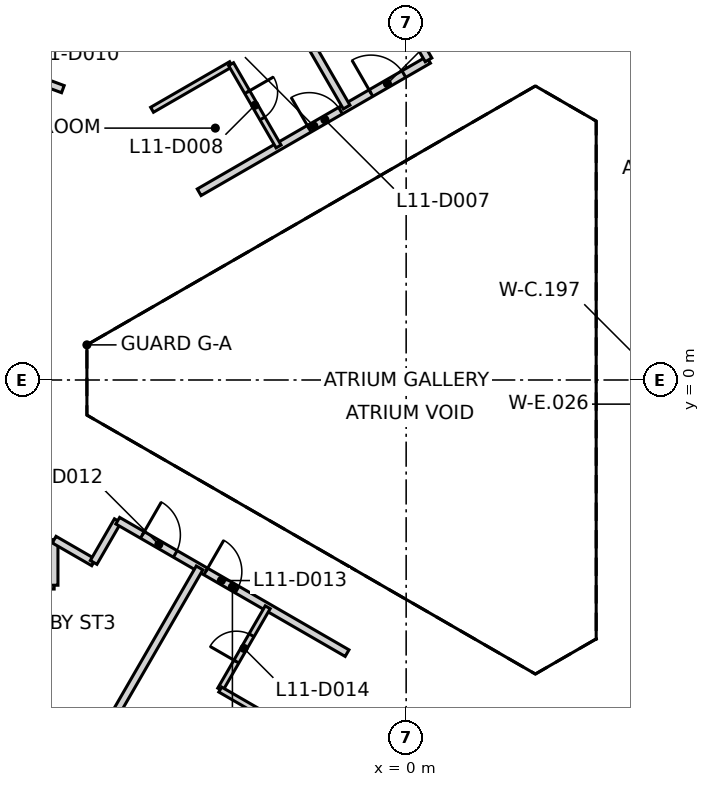
"""IFC4 building model, lengths in metres.
Left out: names, types, materials, properties, quantities, classifications, styles, units other than length and angle.
Written with IfcOpenShell. Run it as: python <this file> out.ifc"""

import sys

from ifc_helpers import new_model, si_unit, direction, frame, frame_2d, origin, place, context, subcontext, project, spatial, rectangle, extrude, element, fill, save


model = new_model("IFC4")
c1 = context("Model", 3, precision=1e-05, world=origin(), true_north=direction((0.0, 1.0)))
c2 = subcontext(c1, "Body", "Model", "MODEL_VIEW")
j1 = project(units=[si_unit("LENGTHUNIT", "METRE"), si_unit("PLANEANGLEUNIT", "RADIAN")], contexts=[c1])
p1 = place(None, origin())
s1 = spatial("IfcSite", under=j1, at=p1, CompositionType="ELEMENT")
p2 = place(p1, origin())
s2 = spatial("IfcBuilding", under=s1, at=p2, CompositionType="ELEMENT")
p3 = place(p2, frame((0.0, 0.0, 53.0)))
s3 = spatial("IfcBuildingStorey", under=s2, at=p3, CompositionType="ELEMENT", Elevation=53.0)
p4 = place(p3, frame((10.42, 6.498, 0.0), z_axis=(0.0, 0.0, 1.0), x_axis=(-0.866021906294, 0.500006057782, 0.0)))
e1 = element("IfcWall", 1, at=p4, inside=s3, PredefinedType="SHEAR", context=c2, shape_type="SweptSolid", body=[
    extrude(rectangle(XDim=11.55, YDim=0.25, at=frame_2d((5.775, 0.0))), origin(), (0.0, 0.0, 1.0), 3.125),
])
p5 = place(p4, frame((10.025, 0.0, 0.0)))
e2 = element("IfcOpeningElement", 2, at=p5, cuts=e1, PredefinedType="OPENING", context=c2, shape_type="SweptSolid", body=[
    extrude(rectangle(XDim=1.2, YDim=2.1, at=frame_2d((0.6, 1.05))), frame((0.0, 0.135, 0.0), z_axis=(0.0, -1.0, 0.0), x_axis=(1.0, 0.0, 0.0)), (0.0, 0.0, 1.0), 0.27),
])
p6 = place(p4, frame((8.725, 0.0, 0.0)))
e3 = element("IfcOpeningElement", 3, at=p6, cuts=e1, PredefinedType="OPENING", context=c2, shape_type="SweptSolid", body=[
    extrude(rectangle(XDim=1.2, YDim=2.1, at=frame_2d((0.6, 1.05))), frame((0.0, 0.135, 0.0), z_axis=(0.0, -1.0, 0.0), x_axis=(1.0, 0.0, 0.0)), (0.0, 0.0, 1.0), 0.27),
])
p7 = place(p3, frame((0.417, -12.273, 0.0), z_axis=(0.0, 0.0, 1.0), x_axis=(0.866021906294, 0.500006057782, 0.0)))
e4 = element("IfcWall", 4, at=p7, inside=s3, PredefinedType="SHEAR", context=c2, shape_type="SweptSolid", body=[
    extrude(rectangle(XDim=11.55, YDim=0.25, at=frame_2d((5.775, 0.0))), origin(), (0.0, 0.0, 1.0), 3.125),
])
p8 = place(p7, frame((10.025, 0.0, 0.0)))
e5 = element("IfcOpeningElement", 5, at=p8, cuts=e4, PredefinedType="OPENING", context=c2, shape_type="SweptSolid", body=[
    extrude(rectangle(XDim=1.2, YDim=2.1, at=frame_2d((0.6, 1.05))), frame((0.0, 0.135, 0.0), z_axis=(0.0, -1.0, 0.0), x_axis=(1.0, 0.0, 0.0)), (0.0, 0.0, 1.0), 0.27),
])
p9 = place(p7, frame((8.725, 0.0, 0.0)))
e6 = element("IfcOpeningElement", 6, at=p9, cuts=e4, PredefinedType="OPENING", context=c2, shape_type="SweptSolid", body=[
    extrude(rectangle(XDim=1.2, YDim=2.1, at=frame_2d((0.6, 1.05))), frame((0.0, 0.135, 0.0), z_axis=(0.0, -1.0, 0.0), x_axis=(1.0, 0.0, 0.0)), (0.0, 0.0, 1.0), 0.27),
])
p10 = place(p3, frame((-16.026, 10.246, 0.0), z_axis=(0.0, 0.0, 1.0), x_axis=(0.937598236139, -0.347720502112, 0.0)))
e7 = element("IfcWall", 7, at=p10, inside=s3, PredefinedType="PARTITIONING", context=c2, shape_type="SweptSolid", body=[
    extrude(rectangle(XDim=7.458, YDim=0.2, at=frame_2d((3.729, 0.0))), origin(), (0.0, 0.0, 1.0), 3.125),
])
p11 = place(p10, frame((3.396, 0.0, 0.0)))
e8 = element("IfcOpeningElement", 8, at=p11, cuts=e7, PredefinedType="OPENING", context=c2, shape_type="SweptSolid", body=[
    extrude(rectangle(XDim=0.95, YDim=2.1, at=frame_2d((0.475, 1.05))), frame((0.0, 0.11, 0.0), z_axis=(0.0, -1.0, 0.0), x_axis=(1.0, 0.0, 0.0)), (0.0, 0.0, 1.0), 0.22),
])
p12 = place(p3, frame((-10.652, -5.4, 0.0), z_axis=(0.0, 0.0, 1.0), x_axis=(1.0, 0.0, 0.0)))
e9 = element("IfcWall", 9, at=p12, inside=s3, PredefinedType="PARTITIONING", context=c2, shape_type="SweptSolid", body=[
    extrude(rectangle(XDim=1.39, YDim=0.2, at=frame_2d((0.695, 0.0))), origin(), (0.0, 0.0, 1.0), 3.125),
])
for number, where, z_axis, x_axis in (
    (10, (-9.262, -5.4, 0.0), (0.0, 0.0, 1.0), (0.0, 1.0, 0.0)),
    (11, (-9.262, -4.2, 0.0), (0.0, 0.0, 1.0), (0.866, -0.5, 0.0)),
):
    element("IfcWall", number, at=place(p3, frame(where, z_axis=z_axis, x_axis=x_axis)), inside=s3, PredefinedType="PARTITIONING", context=c2, shape_type="SweptSolid", body=[
        extrude(rectangle(XDim=1.2, YDim=0.2, at=frame_2d((0.6, 0.0))), origin(), (0.0, 0.0, 1.0), 3.125),
    ])
p13 = place(p3, frame((-8.223, -4.8, 0.0), z_axis=(0.0, 0.0, 1.0), x_axis=(0.499866914522, 0.866102227088, 0.0)))
e12 = element("IfcWall", 12, at=p13, inside=s3, PredefinedType="PARTITIONING", context=c2, shape_type="SweptSolid", body=[
    extrude(rectangle(XDim=1.268, YDim=0.2, at=frame_2d((0.634, 0.0))), origin(), (0.0, 0.0, 1.0), 3.125),
])
p14 = place(p3, frame((-7.589, -3.702, 0.0), z_axis=(0.0, 0.0, 1.0), x_axis=(0.865994210678, -0.500054024153, 0.0)))
e13 = element("IfcWall", 13, at=p14, inside=s3, PredefinedType="PARTITIONING", context=c2, shape_type="SweptSolid", body=[
    extrude(rectangle(XDim=6.969, YDim=0.2, at=frame_2d((3.484, 0.0))), origin(), (0.0, 0.0, 1.0), 3.125),
])
p15 = place(p14, frame((0.749, 0.0, 0.0)))
e14 = element("IfcOpeningElement", 14, at=p15, cuts=e13, PredefinedType="OPENING", context=c2, shape_type="SweptSolid", body=[
    extrude(rectangle(XDim=1.0, YDim=2.1, at=frame_2d((0.5, 1.05))), frame((0.0, 0.11, 0.0), z_axis=(0.0, -1.0, 0.0), x_axis=(1.0, 0.0, 0.0)), (0.0, 0.0, 1.0), 0.22),
])
p16 = place(p14, frame((2.674, 0.0, 0.0)))
e15 = element("IfcOpeningElement", 15, at=p16, cuts=e13, PredefinedType="OPENING", context=c2, shape_type="SweptSolid", body=[
    extrude(rectangle(XDim=0.95, YDim=2.1, at=frame_2d((0.475, 1.05))), frame((0.0, 0.11, 0.0), z_axis=(0.0, -1.0, 0.0), x_axis=(1.0, 0.0, 0.0)), (0.0, 0.0, 1.0), 0.22),
])
p17 = place(p3, frame((-5.446, 4.94, 0.0), z_axis=(0.0, 0.0, 1.0), x_axis=(0.866096332545, 0.499877127655, 0.0)))
e16 = element("IfcWall", 16, at=p17, inside=s3, PredefinedType="PARTITIONING", context=c2, shape_type="SweptSolid", body=[
    extrude(rectangle(XDim=6.969, YDim=0.2, at=frame_2d((3.484, 0.0))), origin(), (0.0, 0.0, 1.0), 3.125),
])
p18 = place(p17, frame((5.219, 0.0, 0.0)))
e17 = element("IfcOpeningElement", 17, at=p18, cuts=e16, PredefinedType="OPENING", context=c2, shape_type="SweptSolid", body=[
    extrude(rectangle(XDim=1.0, YDim=2.1, at=frame_2d((0.5, 1.05))), frame((0.0, 0.11, 0.0), z_axis=(0.0, -1.0, 0.0), x_axis=(1.0, 0.0, 0.0)), (0.0, 0.0, 1.0), 0.22),
])
p19 = place(p17, frame((3.344, 0.0, 0.0)))
e18 = element("IfcOpeningElement", 18, at=p19, cuts=e16, PredefinedType="OPENING", context=c2, shape_type="SweptSolid", body=[
    extrude(rectangle(XDim=0.95, YDim=2.1, at=frame_2d((0.475, 1.05))), frame((0.0, 0.11, 0.0), z_axis=(0.0, -1.0, 0.0), x_axis=(1.0, 0.0, 0.0)), (0.0, 0.0, 1.0), 0.22),
])
p20 = place(p3, frame((-0.045, 9.521, 0.0), z_axis=(0.0, 0.0, 1.0), x_axis=(0.500094716449, -0.865970712311, 0.0)))
e19 = element("IfcWall", 19, at=p20, inside=s3, PredefinedType="PARTITIONING", context=c2, shape_type="SweptSolid", body=[
    extrude(rectangle(XDim=1.268, YDim=0.2, at=frame_2d((0.634, 0.0))), origin(), (0.0, 0.0, 1.0), 3.125),
])
p21 = place(p3, frame((-14.148, -20.035, 0.0), z_axis=(0.0, 0.0, 1.0), x_axis=(0.499978771293, 0.866037659837, 0.0)))
e20 = element("IfcWall", 20, at=p21, inside=s3, PredefinedType="PARTITIONING", context=c2, shape_type="SweptSolid", body=[
    extrude(rectangle(XDim=17.425, YDim=0.2, at=frame_2d((8.712, 0.0))), origin(), (0.0, 0.0, 1.0), 3.125),
])
p22 = place(p3, frame((-10.276, 22.271, 0.0), z_axis=(0.0, 0.0, 1.0), x_axis=(0.499958184216, -0.866049544793, 0.0)))
e21 = element("IfcWall", 21, at=p22, inside=s3, PredefinedType="PARTITIONING", context=c2, shape_type="SweptSolid", body=[
    extrude(rectangle(XDim=17.422, YDim=0.2, at=frame_2d((8.711, 0.0))), origin(), (0.0, 0.0, 1.0), 3.125),
])
p23 = place(p3, frame((-6.686, 7.11, 0.0), z_axis=(0.0, 0.0, 1.0), x_axis=(0.866100915363, 0.499869187296, 0.0)))
e22 = element("IfcWall", 22, at=p23, inside=s3, PredefinedType="PARTITIONING", context=c2, shape_type="SweptSolid", body=[
    extrude(rectangle(XDim=2.401, YDim=0.15, at=frame_2d((1.2, 0.0))), origin(), (0.0, 0.0, 1.0), 3.125),
])
p24 = place(p3, frame((-4.892, -8.145, 0.0), z_axis=(0.0, 0.0, 1.0), x_axis=(0.499711178953, 0.866192090491, 0.0)))
e23 = element("IfcWall", 23, at=p24, inside=s3, PredefinedType="PARTITIONING", context=c2, shape_type="SweptSolid", body=[
    extrude(rectangle(XDim=2.5, YDim=0.15, at=frame_2d((1.25, 0.0))), origin(), (0.0, 0.0, 1.0), 3.125),
])
p25 = place(p24, frame((0.85, 0.0, 0.0)))
e24 = element("IfcOpeningElement", 24, at=p25, cuts=e23, PredefinedType="OPENING", context=c2, shape_type="SweptSolid", body=[
    extrude(rectangle(XDim=0.8, YDim=2.1, at=frame_2d((0.4, 1.05))), frame((0.0, 0.085, 0.0), z_axis=(0.0, -1.0, 0.0), x_axis=(1.0, 0.0, 0.0)), (0.0, 0.0, 1.0), 0.17),
])
p26 = place(p3, frame((-4.892, -8.145, 0.0), z_axis=(0.0, 0.0, 1.0), x_axis=(0.865999212041, -0.500045362686, 0.0)))
e25 = element("IfcWall", 25, at=p26, inside=s3, PredefinedType="PARTITIONING", context=c2, shape_type="SweptSolid", body=[
    extrude(rectangle(XDim=2.4, YDim=0.15, at=frame_2d((1.2, 0.0))), origin(), (0.0, 0.0, 1.0), 3.125),
])
p27 = place(p3, frame((-4.607, 8.31, 0.0), z_axis=(0.0, 0.0, 1.0), x_axis=(0.500004234368, -0.866022959057, 0.0)))
e26 = element("IfcWall", 26, at=p27, inside=s3, PredefinedType="PARTITIONING", context=c2, shape_type="SweptSolid", body=[
    extrude(rectangle(XDim=2.5, YDim=0.15, at=frame_2d((1.25, 0.0))), origin(), (0.0, 0.0, 1.0), 3.125),
])
p28 = place(p27, frame((0.85, 0.0, 0.0)))
e27 = element("IfcOpeningElement", 27, at=p28, cuts=e26, PredefinedType="OPENING", context=c2, shape_type="SweptSolid", body=[
    extrude(rectangle(XDim=0.8, YDim=2.1, at=frame_2d((0.4, 1.05))), frame((0.0, 0.085, 0.0), z_axis=(0.0, -1.0, 0.0), x_axis=(1.0, 0.0, 0.0)), (0.0, 0.0, 1.0), 0.17),
])
p29 = place(p18, origin())
e28 = element("IfcDoor", 28, at=p29, inside=s3, OperationType="SINGLE_SWING_LEFT", PredefinedType="DOOR", context=c2, shape_type="SweptSolid", body=[
    extrude(rectangle(XDim=1.0, YDim=2.1, at=frame_2d((0.5, 1.05))), frame((0.0, 0.025, 0.0), z_axis=(0.0, -1.0, 0.0), x_axis=(1.0, 0.0, 0.0)), (0.0, 0.0, 1.0), 0.05),
])
fill(e17, e28)
p30 = place(p19, origin())
e29 = element("IfcDoor", 29, at=p30, inside=s3, OperationType="SINGLE_SWING_LEFT", PredefinedType="DOOR", context=c2, shape_type="SweptSolid", body=[
    extrude(rectangle(XDim=0.95, YDim=2.1, at=frame_2d((0.475, 1.05))), frame((0.0, 0.025, 0.0), z_axis=(0.0, -1.0, 0.0), x_axis=(1.0, 0.0, 0.0)), (0.0, 0.0, 1.0), 0.05),
])
fill(e18, e29)
p31 = place(p28, frame((0.8, 0.0, 0.0), z_axis=(0.0, 0.0, 1.0), x_axis=(-1.0, 0.0, 0.0)))
e30 = element("IfcDoor", 30, at=p31, inside=s3, OperationType="SINGLE_SWING_LEFT", PredefinedType="DOOR", context=c2, shape_type="SweptSolid", body=[
    extrude(rectangle(XDim=0.8, YDim=2.1, at=frame_2d((0.4, 1.05))), frame((0.0, 0.025, 0.0), z_axis=(0.0, -1.0, 0.0), x_axis=(1.0, 0.0, 0.0)), (0.0, 0.0, 1.0), 0.05),
])
fill(e27, e30)
p32 = place(p15, frame((1.0, 0.0, 0.0), z_axis=(0.0, 0.0, 1.0), x_axis=(-1.0, 0.0, 0.0)))
e31 = element("IfcDoor", 31, at=p32, inside=s3, OperationType="SINGLE_SWING_LEFT", PredefinedType="DOOR", context=c2, shape_type="SweptSolid", body=[
    extrude(rectangle(XDim=1.0, YDim=2.1, at=frame_2d((0.5, 1.05))), frame((0.0, 0.025, 0.0), z_axis=(0.0, -1.0, 0.0), x_axis=(1.0, 0.0, 0.0)), (0.0, 0.0, 1.0), 0.05),
])
fill(e14, e31)
p33 = place(p16, frame((0.95, 0.0, 0.0), z_axis=(0.0, 0.0, 1.0), x_axis=(-1.0, 0.0, 0.0)))
e32 = element("IfcDoor", 32, at=p33, inside=s3, OperationType="SINGLE_SWING_LEFT", PredefinedType="DOOR", context=c2, shape_type="SweptSolid", body=[
    extrude(rectangle(XDim=0.95, YDim=2.1, at=frame_2d((0.475, 1.05))), frame((0.0, 0.025, 0.0), z_axis=(0.0, -1.0, 0.0), x_axis=(1.0, 0.0, 0.0)), (0.0, 0.0, 1.0), 0.05),
])
fill(e15, e32)
p34 = place(p25, frame((0.8, 0.0, 0.0), z_axis=(0.0, 0.0, 1.0), x_axis=(-1.0, 0.0, 0.0)))
e33 = element("IfcDoor", 33, at=p34, inside=s3, OperationType="SINGLE_SWING_LEFT", PredefinedType="DOOR", context=c2, shape_type="SweptSolid", body=[
    extrude(rectangle(XDim=0.8, YDim=2.1, at=frame_2d((0.4, 1.05))), frame((0.0, 0.025, 0.0), z_axis=(0.0, -1.0, 0.0), x_axis=(1.0, 0.0, 0.0)), (0.0, 0.0, 1.0), 0.05),
])
fill(e24, e33)
save(model, sys.argv[1])
